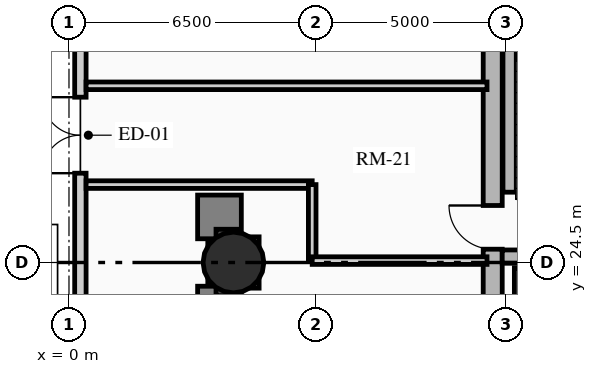
"""IFC4 building model, lengths in metres.
Left out: names, types, materials, properties, quantities, classifications, styles, units other than length and angle.
Written with IfcOpenShell. Run it as: python <this file> out.ifc"""

import sys

from ifc_helpers import new_model, si_unit, direction, frame, frame_2d, origin, origin_2d, place, context, subcontext, project, spatial, rectangle, circle, extrude, source, transform, mapped, element, fill, save


model = new_model("IFC4")
c1 = context("Model", 3, precision=1e-05, world=origin(), true_north=direction((0.0, 1.0)))
c2 = subcontext(c1, "Body", "Model", "MODEL_VIEW")
j1 = project(units=[si_unit("LENGTHUNIT", "METRE"), si_unit("PLANEANGLEUNIT", "RADIAN")], contexts=[c1])
p1 = place(None, origin())
s1 = spatial("IfcSite", under=j1, at=p1, CompositionType="ELEMENT")
p2 = place(p1, origin())
s2 = spatial("IfcBuilding", under=s1, at=p2, CompositionType="ELEMENT")
p3 = place(p2, origin())
s3 = spatial("IfcBuildingStorey", under=s2, at=p3, CompositionType="ELEMENT", Elevation=0.0)
p4 = place(p3, frame((11.15, 17.35, 0.0), z_axis=(0.0, 0.0, 1.0), x_axis=(0.0, 1.0, 0.0)))
e1 = element("IfcWall", 1, at=p4, inside=s3, PredefinedType="SHEAR", context=c2, shape_type="SweptSolid", body=[
    extrude(rectangle(XDim=14.3, YDim=0.5, at=frame_2d((7.15, 0.0))), origin(), (0.0, 0.0, 1.0), 4.8),
])
m1 = source(origin(), c2, "Body", "SweptSolid", [
    extrude(rectangle(XDim=1.15, YDim=2.02, at=frame_2d((0.575, 1.01))), frame((0.0, 0.26, 0.0), z_axis=(0.0, -1.0, 0.0), x_axis=(1.0, 0.0, 0.0)), (0.0, 0.0, 1.0), 0.52),
])
p5 = place(p4, frame((7.5, 0.0, 0.0)))
e2 = element("IfcOpeningElement", 2, at=p5, cuts=e1, PredefinedType="OPENING", context=c2, shape_type="MappedRepresentation", body=[
    mapped(m1, transform((0.0, 0.0, 0.0), x_axis=(1.0, 0.0, 0.0), y_axis=(0.0, 1.0, 0.0), z_axis=(0.0, 0.0, 1.0), scale=1.0)),
])
p6 = place(p3, frame((11.595, 26.35, 0.0), z_axis=(0.0, 0.0, 1.0), x_axis=(0.0, 1.0, 0.0)))
e3 = element("IfcWall", 3, at=p6, inside=s3, PredefinedType="SHEAR", context=c2, shape_type="SweptSolid", body=[
    extrude(rectangle(XDim=5.05, YDim=0.35, at=frame_2d((2.525, 0.0))), origin(), (0.0, 0.0, 1.0), 4.8),
])
p7 = place(p3, frame((11.4, 24.655, 0.0), z_axis=(0.0, 0.0, 1.0), x_axis=(1.0, 0.0, 0.0)))
e4 = element("IfcWall", 4, at=p7, inside=s3, PredefinedType="SHEAR", context=c2, shape_type="SweptSolid", body=[
    extrude(rectangle(XDim=3.285, YDim=0.35, at=frame_2d((1.643, 0.0))), origin(), (0.0, 0.0, 1.0), 4.8),
])
p8 = place(p3, frame((4.328, 24.5, 0.0), z_axis=(0.0, 0.0, 1.0), x_axis=(1.0, 0.0, 0.0)))
e5 = element("IfcColumn", 5, at=p8, inside=s3, PredefinedType="USERDEFINED", context=c2, shape_type="SweptSolid", body=[
    extrude(circle(Radius=0.8, at=origin_2d()), origin(), (0.0, 0.0, 1.0), 4.8),
])
p9 = place(p3, frame((0.3, 4.5, 0.0), z_axis=(0.0, 0.0, 1.0), x_axis=(0.0, 1.0, 0.0)))
e6 = element("IfcWall", 6, at=p9, inside=s3, PredefinedType="SOLIDWALL", context=c2, shape_type="SweptSolid", body=[
    extrude(rectangle(XDim=40.0, YDim=0.3, at=frame_2d((20.0, 0.0))), origin(), (0.0, 0.0, 1.0), 4.485),
])
m2 = source(origin(), c2, "Body", "SweptSolid", [
    extrude(rectangle(XDim=1.4, YDim=2.15, at=frame_2d((0.7, 1.075))), frame((0.0, 0.16, 0.0), z_axis=(0.0, -1.0, 0.0), x_axis=(1.0, 0.0, 0.0)), (0.0, 0.0, 1.0), 0.32),
])
p10 = place(p9, frame((30.5, 0.0, 0.0)))
e7 = element("IfcOpeningElement", 7, at=p10, cuts=e6, PredefinedType="OPENING", context=c2, shape_type="MappedRepresentation", body=[
    mapped(m2, transform((0.0, 0.0, 0.0), x_axis=(1.0, 0.0, 0.0), y_axis=(0.0, 1.0, 0.0), z_axis=(0.0, 0.0, 1.0), scale=1.0)),
])
m3 = source(origin(), c2, "Body", "SweptSolid", [
    extrude(rectangle(XDim=2.0, YDim=2.25, at=frame_2d((1.0, 1.125))), frame((0.0, 0.16, 0.0), z_axis=(0.0, -1.0, 0.0), x_axis=(1.0, 0.0, 0.0)), (0.0, 0.0, 1.0), 0.32),
])
p11 = place(p9, frame((10.5, 0.0, 0.0)))
e8 = element("IfcOpeningElement", 8, at=p11, cuts=e6, PredefinedType="OPENING", context=c2, shape_type="MappedRepresentation", body=[
    mapped(m3, transform((0.0, 0.0, 0.0), x_axis=(1.0, 0.0, 0.0), y_axis=(0.0, 1.0, 0.0), z_axis=(0.0, 0.0, 1.0), scale=1.0)),
])
p12 = place(p9, frame((22.35, 0.0, 0.0)))
e9 = element("IfcOpeningElement", 9, at=p12, cuts=e6, PredefinedType="OPENING", context=c2, shape_type="MappedRepresentation", body=[
    mapped(m3, transform((0.0, 0.0, 0.0), x_axis=(1.0, 0.0, 0.0), y_axis=(0.0, 1.0, 0.0), z_axis=(0.0, 0.0, 1.0), scale=1.0)),
])
p13 = place(p9, frame((16.5, 0.0, 0.0)))
e10 = element("IfcOpeningElement", 10, at=p13, cuts=e6, PredefinedType="OPENING", context=c2, shape_type="MappedRepresentation", body=[
    mapped(m3, transform((0.0, 0.0, 0.0), x_axis=(1.0, 0.0, 0.0), y_axis=(0.0, 1.0, 0.0), z_axis=(0.0, 0.0, 1.0), scale=1.0)),
])
m4 = source(origin(), c2, "Body", "SweptSolid", [
    extrude(rectangle(XDim=3.4, YDim=3.0, at=frame_2d((1.7, 1.5))), frame((0.0, 0.16, 0.0), z_axis=(0.0, -1.0, 0.0), x_axis=(1.0, 0.0, 0.0)), (0.0, 0.0, 1.0), 0.32),
])
p14 = place(p9, frame((3.5, 0.0, 0.0)))
e11 = element("IfcOpeningElement", 11, at=p14, cuts=e6, PredefinedType="OPENING", context=c2, shape_type="MappedRepresentation", body=[
    mapped(m4, transform((0.0, 0.0, 0.0), x_axis=(1.0, 0.0, 0.0), y_axis=(0.0, 1.0, 0.0), z_axis=(0.0, 0.0, 1.0), scale=1.0)),
])
p15 = place(p3, frame((11.82, 21.92, 0.0), z_axis=(0.0, 0.0, 1.0), x_axis=(0.0, 1.0, 0.0)))
e12 = element("IfcWall", 12, at=p15, inside=s3, PredefinedType="SHEAR", context=c2, shape_type="SweptSolid", body=[
    extrude(rectangle(XDim=2.44, YDim=0.2, at=frame_2d((1.22, 0.0))), origin(), (0.0, 0.0, 1.0), 4.8),
])
p16 = place(p3, frame((0.45, 29.15, 0.0), z_axis=(0.0, 0.0, 1.0), x_axis=(1.0, 0.0, 0.0)))
e13 = element("IfcWall", 13, at=p16, inside=s3, PredefinedType="PARTITIONING", context=c2, shape_type="SweptSolid", body=[
    extrude(rectangle(XDim=10.55, YDim=0.2, at=frame_2d((5.275, 0.0))), origin(), (0.0, 0.0, 1.0), 3.529),
])
p17 = place(p3, frame((0.45, 26.55, 0.0), z_axis=(0.0, 0.0, 1.0), x_axis=(1.0, 0.0, 0.0)))
e14 = element("IfcWall", 14, at=p17, inside=s3, PredefinedType="PARTITIONING", context=c2, shape_type="SweptSolid", body=[
    extrude(rectangle(XDim=5.95, YDim=0.2, at=frame_2d((2.975, 0.0))), origin(), (0.0, 0.0, 1.0), 3.529),
])
p18 = place(p3, frame((6.4, 24.55, 0.0), z_axis=(0.0, 0.0, 1.0), x_axis=(0.0, 1.0, 0.0)))
e15 = element("IfcWall", 15, at=p18, inside=s3, PredefinedType="PARTITIONING", context=c2, shape_type="SweptSolid", body=[
    extrude(rectangle(XDim=2.0, YDim=0.2, at=frame_2d((1.0, 0.0))), origin(), (0.0, 0.0, 1.0), 4.485),
])
p19 = place(p3, frame((6.4, 24.55, 0.0), z_axis=(0.0, 0.0, 1.0), x_axis=(1.0, 0.0, 0.0)))
e16 = element("IfcWall", 16, at=p19, inside=s3, PredefinedType="PARTITIONING", context=c2, shape_type="SweptSolid", body=[
    extrude(rectangle(XDim=4.6, YDim=0.2, at=frame_2d((2.3, 0.0))), origin(), (0.0, 0.0, 1.0), 4.485),
])
m5 = source(origin(), c2, "Body", "SweptSolid", [
    extrude(rectangle(XDim=2.0, YDim=2.25, at=frame_2d((1.0, 1.125))), frame((0.0, 0.025, 0.0), z_axis=(0.0, -1.0, 0.0), x_axis=(1.0, 0.0, 0.0)), (0.0, 0.0, 1.0), 0.05),
])
p20 = place(p12, origin())
e17 = element("IfcDoor", 17, at=p20, inside=s3, OperationType="DOUBLE_DOOR_SINGLE_SWING", PredefinedType="DOOR", context=c2, shape_type="MappedRepresentation", body=[
    mapped(m5, transform((0.0, 0.0, 0.0), x_axis=(1.0, 0.0, 0.0), y_axis=(0.0, 1.0, 0.0), z_axis=(0.0, 0.0, 1.0), scale=1.0)),
])
fill(e9, e17)
m6 = source(origin(), c2, "Body", "SweptSolid", [
    extrude(rectangle(XDim=1.15, YDim=2.02, at=frame_2d((0.575, 1.01))), frame((0.0, 0.025, 0.0), z_axis=(0.0, -1.0, 0.0), x_axis=(1.0, 0.0, 0.0)), (0.0, 0.0, 1.0), 0.05),
])
p21 = place(p5, origin())
e18 = element("IfcDoor", 18, at=p21, inside=s3, OperationType="SINGLE_SWING_RIGHT", PredefinedType="DOOR", context=c2, shape_type="MappedRepresentation", body=[
    mapped(m6, transform((0.0, 0.0, 0.0), x_axis=(1.0, 0.0, 0.0), y_axis=(0.0, 1.0, 0.0), z_axis=(0.0, 0.0, 1.0), scale=1.0)),
])
fill(e2, e18)
save(model, sys.argv[1])
